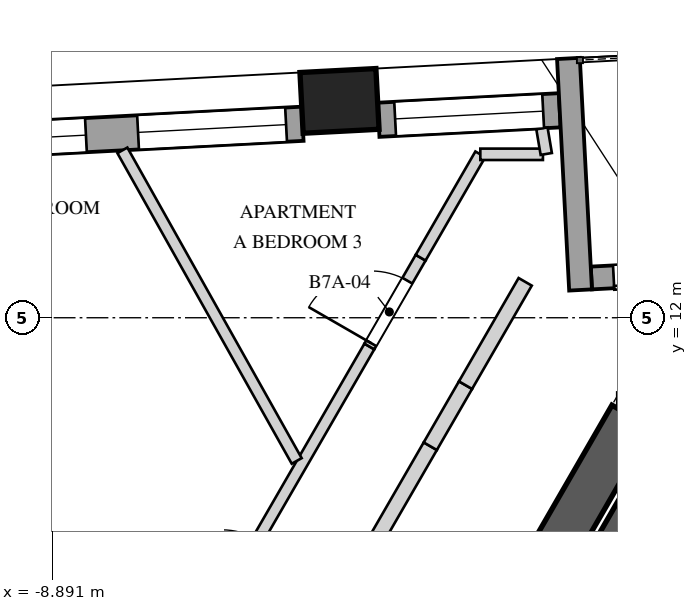
"""IFC4 building model, lengths in metres.
Left out: names, types, materials, properties, quantities, classifications, styles, units other than length and angle.
Written with IfcOpenShell. Run it as: python <this file> out.ifc"""

import sys

from ifc_helpers import new_model, si_unit, direction, frame, frame_2d, origin, origin_2d, place, context, subcontext, project, spatial, polyline, rectangle, outline, extrude, element, fill, save


model = new_model("IFC4")
c1 = context("Model", 3, precision=1e-05, world=origin(), true_north=direction((0.0, 1.0)))
c2 = subcontext(c1, "Body", "Model", "MODEL_VIEW")
j1 = project(units=[si_unit("LENGTHUNIT", "METRE"), si_unit("PLANEANGLEUNIT", "RADIAN")], contexts=[c1])
p1 = place(None, origin())
s1 = spatial("IfcSite", under=j1, at=p1, CompositionType="ELEMENT")
p2 = place(p1, origin())
s2 = spatial("IfcBuilding", under=s1, at=p2, CompositionType="ELEMENT")
p3 = place(p2, frame((0.0, 0.0, 274.4)))
s3 = spatial("IfcBuildingStorey", under=s2, at=p3, CompositionType="ELEMENT", Elevation=274.4)
p4 = place(p3, frame((-1.27, 10.7, 0.0), z_axis=(0.0, 0.0, 1.0), x_axis=(-0.499999536116, -0.866025671608, 0.0)))
e1 = element("IfcWall", 1, at=p4, inside=s3, PredefinedType="SHEAR", context=c2, shape_type="SweptSolid", body=[
    extrude(rectangle(XDim=17.263, YDim=0.6, at=frame_2d((8.631, 0.0))), origin(), (0.0, 0.0, 1.0), 4.0),
])
p5 = place(p4, frame((6.836, 0.0, 0.0)))
e2 = element("IfcOpeningElement", 2, at=p5, cuts=e1, PredefinedType="OPENING", context=c2, shape_type="SweptSolid", body=[
    extrude(rectangle(XDim=1.0, YDim=2.4, at=frame_2d((0.5, 1.2))), frame((0.0, 0.31, 0.0), z_axis=(0.0, -1.0, 0.0), x_axis=(1.0, 0.0, 0.0)), (0.0, 0.0, 1.0), 0.62),
])
p6 = place(p4, frame((15.034, 0.0, 0.0)))
e3 = element("IfcOpeningElement", 3, at=p6, cuts=e1, PredefinedType="OPENING", context=c2, shape_type="SweptSolid", body=[
    extrude(rectangle(XDim=0.8, YDim=2.1, at=frame_2d((0.4, 1.05))), frame((0.0, 0.31, 0.0), z_axis=(0.0, -1.0, 0.0), x_axis=(1.0, 0.0, 0.0)), (0.0, 0.0, 1.0), 0.62),
])
p7 = place(p3, frame((-5.115, 14.853, -0.35), z_axis=(0.0, 0.0, 1.0), x_axis=(-0.998629534755, -0.052335956243, 0.0)))
e4 = element("IfcColumn", 4, at=p7, inside=s3, PredefinedType="COLUMN", context=c2, shape_type="SweptSolid", body=[
    extrude(rectangle(XDim=1.0, YDim=0.8, at=origin_2d()), origin(), (0.0, 0.0, 1.0), 4.35),
])
p8 = place(p3, frame((-2.217, 14.729, 0.0), z_axis=(0.0, 0.0, 1.0), x_axis=(-0.998627701279, -0.052370929331, 0.0)))
e5 = element("IfcWall", 5, at=p8, inside=s3, PredefinedType="SOLIDWALL", context=c2, shape_type="SweptSolid", body=[
    extrude(rectangle(XDim=2.387, YDim=0.45, at=frame_2d((1.193, 0.0))), origin(), (0.0, 0.0, 1.0), 3.3),
])
p9 = place(p8, frame((0.218, 0.0, 0.4)))
e6 = element("IfcOpeningElement", 6, at=p9, cuts=e5, PredefinedType="OPENING", context=c2, shape_type="SweptSolid", body=[
    extrude(rectangle(XDim=1.95, YDim=2.75, at=frame_2d((0.975, 1.375))), frame((0.0, 0.235, 0.0), z_axis=(0.0, -1.0, 0.0), x_axis=(1.0, 0.0, 0.0)), (0.0, 0.0, 1.0), 0.47),
])
p10 = place(p3, frame((-5.599, 14.552, 0.0), z_axis=(0.0, 0.0, 1.0), x_axis=(-0.998628023429, -0.052364786088, 0.0)))
e7 = element("IfcWall", 7, at=p10, inside=s3, PredefinedType="SOLIDWALL", context=c2, shape_type="SweptSolid", body=[
    extrude(rectangle(XDim=7.66, YDim=0.45, at=frame_2d((3.83, 0.0))), origin(), (0.0, 0.0, 1.0), 3.3),
])
p11 = place(p10, frame((0.218, 0.0, 0.4)))
e8 = element("IfcOpeningElement", 8, at=p11, cuts=e7, PredefinedType="OPENING", context=c2, shape_type="SweptSolid", body=[
    extrude(rectangle(XDim=1.95, YDim=2.75, at=frame_2d((0.975, 1.375))), frame((0.0, 0.235, 0.0), z_axis=(0.0, -1.0, 0.0), x_axis=(1.0, 0.0, 0.0)), (0.0, 0.0, 1.0), 0.47),
])
p12 = place(p10, frame((2.855, 0.0, 0.4)))
e9 = element("IfcOpeningElement", 9, at=p12, cuts=e7, PredefinedType="OPENING", context=c2, shape_type="SweptSolid", body=[
    extrude(rectangle(XDim=1.95, YDim=2.75, at=frame_2d((0.975, 1.375))), frame((0.0, 0.235, 0.0), z_axis=(0.0, -1.0, 0.0), x_axis=(1.0, 0.0, 0.0)), (0.0, 0.0, 1.0), 0.47),
])
p13 = place(p10, frame((5.867, 0.0, 0.4)))
e10 = element("IfcOpeningElement", 10, at=p13, cuts=e7, PredefinedType="OPENING", context=c2, shape_type="SweptSolid", body=[
    extrude(rectangle(XDim=1.2, YDim=2.75, at=frame_2d((0.6, 1.375))), frame((0.0, 0.235, 0.0), z_axis=(0.0, -1.0, 0.0), x_axis=(1.0, 0.0, 0.0)), (0.0, 0.0, 1.0), 0.47),
])
p14 = place(p3, frame((0.482, 12.643, 0.0), z_axis=(0.0, 0.0, 1.0), x_axis=(-0.998630775221, -0.052312281362, 0.0)))
e11 = element("IfcWall", 11, at=p14, inside=s3, PredefinedType="SOLIDWALL", context=c2, shape_type="SweptSolid", body=[
    extrude(rectangle(XDim=2.287, YDim=0.3, at=frame_2d((1.144, 0.0))), origin(), (0.0, 0.0, 1.0), 3.3),
])
p15 = place(p14, frame((0.293, 0.0, 0.0)))
e12 = element("IfcOpeningElement", 12, at=p15, cuts=e11, PredefinedType="OPENING", context=c2, shape_type="SweptSolid", body=[
    extrude(rectangle(XDim=1.7, YDim=2.5, at=frame_2d((0.85, 1.25))), frame((0.0, 0.16, 0.0), z_axis=(0.0, -1.0, 0.0), x_axis=(1.0, 0.0, 0.0)), (0.0, 0.0, 1.0), 0.32),
])
p16 = place(p3, frame((-2.103, 15.411, 0.0), z_axis=(0.0, 0.0, 1.0), x_axis=(0.052348771756, -0.99862886304, 0.0)))
e13 = element("IfcWall", 13, at=p16, inside=s3, PredefinedType="SOLIDWALL", context=c2, shape_type="SweptSolid", body=[
    extrude(rectangle(XDim=3.05, YDim=0.3, at=frame_2d((1.525, 0.0))), origin(), (0.0, 0.0, 1.0), 3.3),
])
p17 = place(p3, frame((-0.896, 9.847, 0.0), z_axis=(0.0, 0.0, 1.0), x_axis=(-0.500009909098, -0.866019682689, 0.0)))
e14 = element("IfcWall", 14, at=p17, inside=s3, PredefinedType="SOLIDWALL", context=c2, shape_type="SweptSolid", body=[
    extrude(rectangle(XDim=6.2, YDim=0.7, at=frame_2d((3.1, 0.0))), origin(), (0.0, 0.0, 1.0), 3.65),
])
p18 = place(p3, frame((-6.925, 7.806, 0.0), z_axis=(0.0, 0.0, 1.0), x_axis=(0.500024628788, 0.86601118388, 0.0)))
e15 = element("IfcWall", 15, at=p18, inside=s3, PredefinedType="PARTITIONING", context=c2, shape_type="SweptSolid", body=[
    extrude(rectangle(XDim=4.406, YDim=0.15, at=frame_2d((2.203, 0.0))), origin(), (0.0, 0.0, 1.0), 3.65),
])
p19 = place(p18, frame((0.524, 0.0, 0.0)))
e16 = element("IfcOpeningElement", 16, at=p19, cuts=e15, PredefinedType="OPENING", context=c2, shape_type="SweptSolid", body=[
    extrude(rectangle(XDim=0.95, YDim=2.4, at=frame_2d((0.475, 1.2))), frame((0.0, 0.085, 0.0), z_axis=(0.0, -1.0, 0.0), x_axis=(1.0, 0.0, 0.0)), (0.0, 0.0, 1.0), 0.17),
])
p20 = place(p3, frame((-4.722, 11.622, 0.0), z_axis=(0.0, 0.0, 1.0), x_axis=(0.499973075538, 0.866040948072, 0.0)))
e17 = element("IfcWall", 17, at=p20, inside=s3, PredefinedType="PARTITIONING", context=c2, shape_type="SweptSolid", body=[
    extrude(outline(polyline([(0.0, 0.0), (1.349, 0.0), (1.349, 2.95), (0.455, 2.95), (0.455, 3.65), (0.0, 3.65), (0.0, 0.0)])), frame((0.0, 0.075, 0.0), z_axis=(0.0, -1.0, 0.0), x_axis=(1.0, 0.0, 0.0)), (0.0, 0.0, 1.0), 0.15),
])
p21 = place(p20, frame((0.05, 0.0, 0.0)))
e18 = element("IfcOpeningElement", 18, at=p21, cuts=e17, PredefinedType="OPENING", context=c2, shape_type="SweptSolid", body=[
    extrude(rectangle(XDim=0.95, YDim=2.4, at=frame_2d((0.475, 1.2))), frame((0.0, 0.085, 0.0), z_axis=(0.0, -1.0, 0.0), x_axis=(1.0, 0.0, 0.0)), (0.0, 0.0, 1.0), 0.17),
])
p22 = place(p3, frame((-4.047, 12.79, 0.0), z_axis=(0.0, 0.0, 1.0), x_axis=(0.500018540756, 0.866014699009, 0.0)))
e19 = element("IfcWall", 19, at=p22, inside=s3, PredefinedType="PARTITIONING", context=c2, shape_type="SweptSolid", body=[
    extrude(rectangle(XDim=1.57, YDim=0.15, at=frame_2d((0.785, 0.0))), origin(), (0.0, 0.0, 1.0), 3.65),
])
p23 = place(p3, frame((-13.737, 13.9, 0.0), z_axis=(0.0, 0.0, 1.0), x_axis=(0.702901092217, -0.711287603266, 0.0)))
e20 = element("IfcWall", 20, at=p23, inside=s3, PredefinedType="PARTITIONING", context=c2, shape_type="SweptSolid", body=[
    extrude(rectangle(XDim=9.199, YDim=0.15, at=frame_2d((4.6, 0.0))), origin(), (0.0, 0.0, 1.0), 2.75),
])
p24 = place(p3, frame((-7.971, 14.202, 0.0), z_axis=(0.0, 0.0, 1.0), x_axis=(0.489424944671, -0.872045425155, 0.0)))
e21 = element("IfcWall", 21, at=p24, inside=s3, PredefinedType="PARTITIONING", context=c2, shape_type="SweptSolid", body=[
    extrude(rectangle(XDim=4.686, YDim=0.15, at=frame_2d((2.343, 0.0))), origin(), (0.0, 0.0, 1.0), 3.65),
])
p25 = place(p3, frame((-3.262, 14.15, 0.0), z_axis=(0.0, 0.0, 1.0), x_axis=(1.0, 0.0, 0.0)))
e22 = element("IfcWall", 22, at=p25, inside=s3, PredefinedType="PARTITIONING", context=c2, shape_type="SweptSolid", body=[
    extrude(rectangle(XDim=0.824, YDim=0.15, at=frame_2d((0.412, 0.0))), origin(), (0.0, 0.0, 1.0), 3.65),
])
p26 = place(p3, frame((-2.394, 14.155, 0.0), z_axis=(0.0, 0.0, 1.0), x_axis=(-0.16729669573, 0.985906595778, 0.0)))
e23 = element("IfcWall", 23, at=p26, inside=s3, PredefinedType="PARTITIONING", context=c2, shape_type="SweptSolid", body=[
    extrude(rectangle(XDim=0.342, YDim=0.15, at=frame_2d((0.171, 0.0))), origin(), (0.0, 0.0, 1.0), 3.65),
])
p27 = place(p3, frame((-5.947, 6.801, 0.0), z_axis=(0.0, 0.0, 1.0), x_axis=(0.500007556608, 0.866021040931, 0.0)))
e24 = element("IfcWall", 24, at=p27, inside=s3, PredefinedType="SOLIDWALL", context=c2, shape_type="SweptSolid", body=[
    extrude(rectangle(XDim=4.052, YDim=0.2, at=frame_2d((2.026, 0.0))), origin(), (0.0, 0.0, 1.0), 3.65),
])
p28 = place(p3, frame((-3.92, 10.31, 0.0), z_axis=(0.0, 0.0, 1.0), x_axis=(0.500102178127, 0.865966403178, 0.0)))
e25 = element("IfcWall", 25, at=p28, inside=s3, PredefinedType="SOLIDWALL", context=c2, shape_type="SweptSolid", body=[
    extrude(rectangle(XDim=0.927, YDim=0.2, at=frame_2d((0.464, 0.0))), origin(), (0.0, 0.0, 1.0), 2.95),
])
p29 = place(p3, frame((-3.457, 11.113, 0.0), z_axis=(0.0, 0.0, 1.0), x_axis=(0.500036592568, 0.866004276025, 0.0)))
e26 = element("IfcWall", 26, at=p29, inside=s3, PredefinedType="SOLIDWALL", context=c2, shape_type="SweptSolid", body=[
    extrude(rectangle(XDim=1.57, YDim=0.2, at=frame_2d((0.785, 0.0))), origin(), (0.0, 0.0, 1.0), 3.65),
])
p30 = place(p9, origin())
e27 = element("IfcWindow", 27, at=p30, inside=s3, PartitioningType="SINGLE_PANEL", PredefinedType="WINDOW", context=c2, shape_type="SweptSolid", body=[
    extrude(rectangle(XDim=1.95, YDim=2.75, at=frame_2d((0.975, 1.375))), frame((0.0, 0.03, 0.0), z_axis=(0.0, -1.0, 0.0), x_axis=(1.0, 0.0, 0.0)), (0.0, 0.0, 1.0), 0.06),
])
fill(e6, e27)
p31 = place(p11, origin())
e28 = element("IfcWindow", 28, at=p31, inside=s3, PartitioningType="SINGLE_PANEL", PredefinedType="WINDOW", context=c2, shape_type="SweptSolid", body=[
    extrude(rectangle(XDim=1.95, YDim=2.75, at=frame_2d((0.975, 1.375))), frame((0.0, 0.03, 0.0), z_axis=(0.0, -1.0, 0.0), x_axis=(1.0, 0.0, 0.0)), (0.0, 0.0, 1.0), 0.06),
])
fill(e8, e28)
p32 = place(p12, origin())
e29 = element("IfcWindow", 29, at=p32, inside=s3, PartitioningType="SINGLE_PANEL", PredefinedType="WINDOW", context=c2, shape_type="SweptSolid", body=[
    extrude(rectangle(XDim=1.95, YDim=2.75, at=frame_2d((0.975, 1.375))), frame((0.0, 0.03, 0.0), z_axis=(0.0, -1.0, 0.0), x_axis=(1.0, 0.0, 0.0)), (0.0, 0.0, 1.0), 0.06),
])
fill(e9, e29)
p33 = place(p15, origin())
e30 = element("IfcDoor", 30, at=p33, inside=s3, OperationType="SLIDING_TO_LEFT", PredefinedType="DOOR", context=c2, shape_type="SweptSolid", body=[
    extrude(rectangle(XDim=1.7, YDim=2.5, at=frame_2d((0.85, 1.25))), frame((0.0, 0.025, 0.0), z_axis=(0.0, -1.0, 0.0), x_axis=(1.0, 0.0, 0.0)), (0.0, 0.0, 1.0), 0.05),
])
fill(e12, e30)
p34 = place(p21, origin())
e31 = element("IfcDoor", 31, at=p34, inside=s3, OperationType="SINGLE_SWING_RIGHT", PredefinedType="DOOR", context=c2, shape_type="SweptSolid", body=[
    extrude(rectangle(XDim=0.95, YDim=2.4, at=frame_2d((0.475, 1.2))), frame((0.0, 0.025, 0.0), z_axis=(0.0, -1.0, 0.0), x_axis=(1.0, 0.0, 0.0)), (0.0, 0.0, 1.0), 0.05),
])
fill(e18, e31)
save(model, sys.argv[1])
